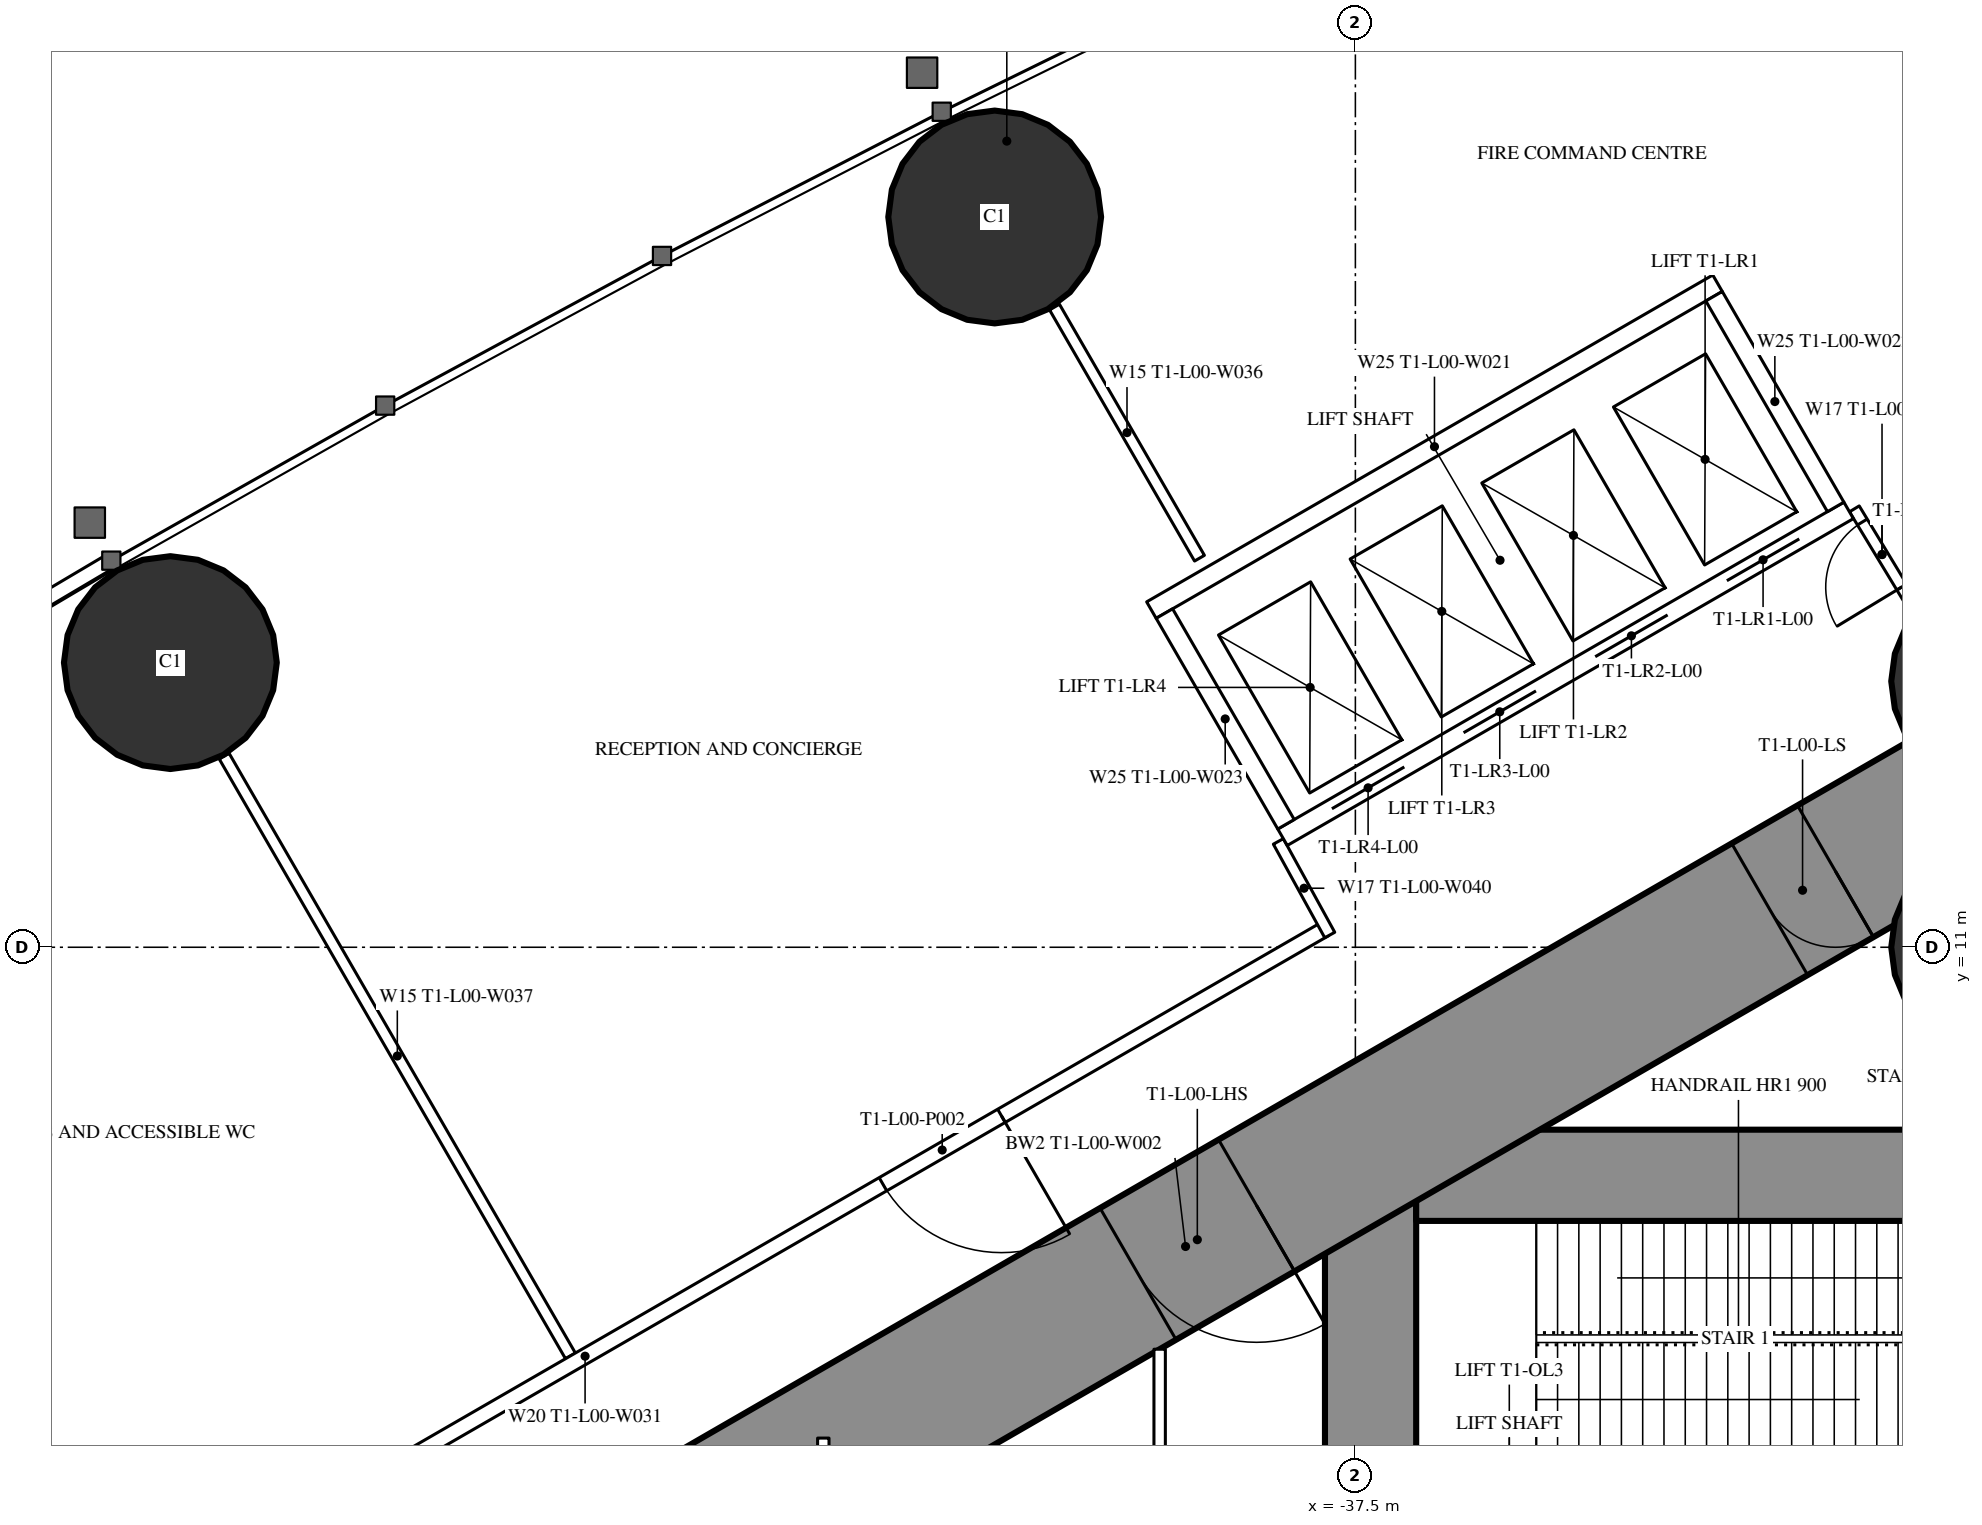
"""IFC4 building model, lengths in metres.
Left out: names, types, materials, properties, quantities, classifications, styles, units other than length and angle.
Written with IfcOpenShell. Run it as: python <this file> out.ifc"""

import sys

from ifc_helpers import new_model, si_unit, direction, frame, frame_2d, origin, origin_2d, place, context, subcontext, project, spatial, rectangle, hollow_circle, extrude, element, fill, save


model = new_model("IFC4")
c1 = context("Model", 3, precision=1e-05, world=origin(), true_north=direction((0.0, 1.0)))
c2 = subcontext(c1, "Body", "Model", "MODEL_VIEW")
j1 = project(units=[si_unit("LENGTHUNIT", "METRE"), si_unit("PLANEANGLEUNIT", "RADIAN")], contexts=[c1])
p1 = place(None, origin())
s1 = spatial("IfcSite", under=j1, at=p1, CompositionType="ELEMENT")
p2 = place(p1, origin())
s2 = spatial("IfcBuilding", under=s1, at=p2, CompositionType="ELEMENT")
p3 = place(p2, origin())
s3 = spatial("IfcBuildingStorey", under=s2, at=p3, CompositionType="ELEMENT", Elevation=0.0)
for number, where, z_axis, x_axis in (
    (1, (-29.05, 11.0, 0.0), (0.0, 0.0, 1.0), (1.0, 0.0, 0.0)),
    (2, (-29.05, 14.5, 0.0), (0.0, 0.0, 1.0), (1.0, 0.0, 0.0)),
    (3, (-42.245, 20.607, 0.0), (0.0, 0.0, 1.0), (1.0, 0.0, 0.0)),
    (4, (-53.09, 14.745, 0.0), (0.0, 0.0, 1.0), (1.0, 0.0, 0.0)),
):
    element("IfcColumn", number, at=place(p3, frame(where, z_axis=z_axis, x_axis=x_axis)), inside=s3, PredefinedType="COLUMN", context=c2, shape_type="SweptSolid", body=[
        extrude(hollow_circle(Radius=1.4, WallThickness=0.12, at=origin_2d()), origin(), (0.0, 0.0, 1.0), 7.2),
    ])
p4 = place(p3, frame((-37.3, 8.6, 0.0), z_axis=(0.0, 0.0, 1.0), x_axis=(0.0, -1.0, 0.0)))
e5 = element("IfcWall", 5, at=p4, inside=s3, PredefinedType="SHEAR", context=c2, shape_type="SweptSolid", body=[
    extrude(rectangle(XDim=17.2, YDim=1.2, at=frame_2d((8.6, 0.0))), origin(), (0.0, 0.0, 1.0), 7.2),
])
p5 = place(p4, frame((7.7, 0.0, 0.0)))
e6 = element("IfcOpeningElement", 6, at=p5, cuts=e5, PredefinedType="OPENING", context=c2, shape_type="SweptSolid", body=[
    extrude(rectangle(XDim=1.8, YDim=2.2, at=frame_2d((0.9, 1.1))), frame((0.0, 0.61, 0.0), z_axis=(0.0, -1.0, 0.0), x_axis=(1.0, 0.0, 0.0)), (0.0, 0.0, 1.0), 1.22),
])
p6 = place(p3, frame((-28.3, 8.0, 0.0), z_axis=(0.0, 0.0, 1.0), x_axis=(-1.0, 0.0, 0.0)))
e7 = element("IfcWall", 7, at=p6, inside=s3, PredefinedType="SHEAR", context=c2, shape_type="SweptSolid", body=[
    extrude(rectangle(XDim=8.4, YDim=1.2, at=frame_2d((4.2, 0.0))), origin(), (0.0, 0.0, 1.0), 7.2),
])
p7 = place(p6, frame((0.25, 0.0, 0.0)))
e8 = element("IfcOpeningElement", 8, at=p7, cuts=e7, PredefinedType="OPENING", context=c2, shape_type="SweptSolid", body=[
    extrude(rectangle(XDim=1.0, YDim=2.2, at=frame_2d((0.5, 1.1))), frame((0.0, 0.61, 0.0), z_axis=(0.0, -1.0, 0.0), x_axis=(1.0, 0.0, 0.0)), (0.0, 0.0, 1.0), 1.22),
])
p8 = place(p3, frame((-27.2, 14.3, 0.0), z_axis=(0.0, 0.0, 1.0), x_axis=(-0.866026593062, -0.499997940104, 0.0)))
e9 = element("IfcWall", 9, at=p8, inside=s3, PredefinedType="SHEAR", context=c2, shape_type="SweptSolid", body=[
    extrude(rectangle(XDim=28.946, YDim=2.0, at=frame_2d((14.473, 0.0))), origin(), (0.0, 0.0, 1.0), 7.2),
])
p9 = place(p8, frame((4.6, 0.0, 0.0)))
e10 = element("IfcOpeningElement", 10, at=p9, cuts=e9, PredefinedType="OPENING", context=c2, shape_type="SweptSolid", body=[
    extrude(rectangle(XDim=1.0, YDim=2.2, at=frame_2d((0.5, 1.1))), frame((0.0, 1.01, 0.0), z_axis=(0.0, -1.0, 0.0), x_axis=(1.0, 0.0, 0.0)), (0.0, 0.0, 1.0), 2.02),
])
p10 = place(p8, frame((13.395, 0.0, 0.0)))
e11 = element("IfcOpeningElement", 11, at=p10, cuts=e9, PredefinedType="OPENING", context=c2, shape_type="SweptSolid", body=[
    extrude(rectangle(XDim=1.8, YDim=2.2, at=frame_2d((0.9, 1.1))), frame((0.0, 1.01, 0.0), z_axis=(0.0, -1.0, 0.0), x_axis=(1.0, 0.0, 0.0)), (0.0, 0.0, 1.0), 2.02),
])
p11 = place(p3, frame((-57.429, 13.976, 0.0), z_axis=(0.0, 0.0, 1.0), x_axis=(0.860382514165, 0.50964882941, 0.0)))
e12 = element("IfcWall", 12, at=p11, inside=s3, PredefinedType="STANDARD", context=c2, shape_type="SweptSolid", body=[
    extrude(rectangle(XDim=4.14, YDim=0.2, at=frame_2d((2.07, 0.0))), origin(), (0.0, 0.0, 1.0), 6.85),
])
p12 = place(p11, frame((1.02, 0.0, 0.0)))
e13 = element("IfcOpeningElement", 13, at=p12, cuts=e12, PredefinedType="OPENING", context=c2, shape_type="SweptSolid", body=[
    extrude(rectangle(XDim=1.8, YDim=2.4, at=frame_2d((0.9, 1.2))), frame((0.0, 0.11, 0.0), z_axis=(0.0, -1.0, 0.0), x_axis=(1.0, 0.0, 0.0)), (0.0, 0.0, 1.0), 0.22),
])
p13 = place(p3, frame((-47.827, 5.624, 0.0), z_axis=(0.0, 0.0, 1.0), x_axis=(-0.499995404498, 0.866028056982, 0.0)))
e14 = element("IfcWall", 14, at=p13, inside=s3, PredefinedType="PARTITIONING", context=c2, shape_type="SweptSolid", body=[
    extrude(rectangle(XDim=9.11, YDim=0.15, at=frame_2d((4.555, 0.0))), origin(), (0.0, 0.0, 1.0), 5.85),
])
p14 = place(p3, frame((-39.551, 16.119, 0.0), z_axis=(0.0, 0.0, 1.0), x_axis=(-0.500014214979, 0.866017196607, 0.0)))
e15 = element("IfcWall", 15, at=p14, inside=s3, PredefinedType="PARTITIONING", context=c2, shape_type="SweptSolid", body=[
    extrude(rectangle(XDim=3.815, YDim=0.15, at=frame_2d((1.907, 0.0))), origin(), (0.0, 0.0, 1.0), 6.85),
])
p15 = place(p3, frame((-27.5, 17.244, 0.0), z_axis=(0.0, 0.0, 1.0), x_axis=(-0.866039316896, -0.499975901009, 0.0)))
e16 = element("IfcWall", 16, at=p15, inside=s3, PredefinedType="PARTITIONING", context=c2, shape_type="SweptSolid", body=[
    extrude(rectangle(XDim=3.169, YDim=0.2, at=frame_2d((1.584, 0.0))), origin(), (0.0, 0.0, 1.0), 6.85),
])
p16 = place(p3, frame((-37.9, 11.24, 0.0), z_axis=(0.0, 0.0, 1.0), x_axis=(-0.866022995118, -0.50000417191, 0.0)))
e17 = element("IfcWall", 17, at=p16, inside=s3, PredefinedType="PARTITIONING", context=c2, shape_type="SweptSolid", body=[
    extrude(rectangle(XDim=22.48, YDim=0.2, at=frame_2d((11.24, 0.0))), origin(), (0.0, 0.0, 1.0), 6.85),
])
p17 = place(p16, frame((14.644, 0.0, 0.0)))
e18 = element("IfcOpeningElement", 18, at=p17, cuts=e17, PredefinedType="OPENING", context=c2, shape_type="SweptSolid", body=[
    extrude(rectangle(XDim=1.8, YDim=2.2, at=frame_2d((0.9, 1.1))), frame((0.0, 0.11, 0.0), z_axis=(0.0, -1.0, 0.0), x_axis=(1.0, 0.0, 0.0)), (0.0, 0.0, 1.0), 0.22),
])
p18 = place(p16, frame((20.069, 0.0, 0.0)))
e19 = element("IfcOpeningElement", 19, at=p18, cuts=e17, PredefinedType="OPENING", context=c2, shape_type="SweptSolid", body=[
    extrude(rectangle(XDim=1.8, YDim=2.2, at=frame_2d((0.9, 1.1))), frame((0.0, 0.11, 0.0), z_axis=(0.0, -1.0, 0.0), x_axis=(1.0, 0.0, 0.0)), (0.0, 0.0, 1.0), 0.22),
])
p19 = place(p16, frame((4.915, 0.0, 0.0)))
e20 = element("IfcOpeningElement", 20, at=p19, cuts=e17, PredefinedType="OPENING", context=c2, shape_type="SweptSolid", body=[
    extrude(rectangle(XDim=1.8, YDim=2.2, at=frame_2d((0.9, 1.1))), frame((0.0, 0.11, 0.0), z_axis=(0.0, -1.0, 0.0), x_axis=(1.0, 0.0, 0.0)), (0.0, 0.0, 1.0), 0.22),
])
p20 = place(p3, frame((-30.207, 15.566, 0.0), z_axis=(0.0, 0.0, 1.0), x_axis=(-0.518374889333, 0.855153479855, 0.0)))
e21 = element("IfcWall", 21, at=p20, inside=s3, PredefinedType="PARTITIONING", context=c2, shape_type="SweptSolid", body=[
    extrude(rectangle(XDim=1.405, YDim=0.15, at=frame_2d((0.703, 0.0))), origin(), (0.0, 0.0, 1.0), 6.85),
])
p21 = place(p20, frame((0.202, 0.0, 0.0)))
e22 = element("IfcOpeningElement", 22, at=p21, cuts=e21, PredefinedType="OPENING", context=c2, shape_type="SweptSolid", body=[
    extrude(rectangle(XDim=1.0, YDim=2.2, at=frame_2d((0.5, 1.1))), frame((0.0, 0.085, 0.0), z_axis=(0.0, -1.0, 0.0), x_axis=(1.0, 0.0, 0.0)), (0.0, 0.0, 1.0), 0.17),
])
p22 = place(p3, frame((-38.513, 12.392, 0.0), z_axis=(0.0, 0.0, 1.0), x_axis=(0.481358300093, -0.876523922624, 0.0)))
e23 = element("IfcWall", 23, at=p22, inside=s3, PredefinedType="PARTITIONING", context=c2, shape_type="SweptSolid", body=[
    extrude(rectangle(XDim=1.405, YDim=0.15, at=frame_2d((0.703, 0.0))), origin(), (0.0, 0.0, 1.0), 6.85),
])
p23 = place(p3, frame((-40.075, 5.712, 0.0), z_axis=(0.0, 0.0, 1.0), x_axis=(0.0, -1.0, 0.0)))
e24 = element("IfcWall", 24, at=p23, inside=s3, PredefinedType="PARTITIONING", context=c2, shape_type="SweptSolid", body=[
    extrude(rectangle(XDim=11.424, YDim=0.15, at=frame_2d((5.712, 0.0))), origin(), (0.0, 0.0, 1.0), 6.85),
])
p24 = place(p23, frame((4.812, 0.0, 0.0)))
e25 = element("IfcOpeningElement", 25, at=p24, cuts=e24, PredefinedType="OPENING", context=c2, shape_type="SweptSolid", body=[
    extrude(rectangle(XDim=1.8, YDim=2.2, at=frame_2d((0.9, 1.1))), frame((0.0, 0.085, 0.0), z_axis=(0.0, -1.0, 0.0), x_axis=(1.0, 0.0, 0.0)), (0.0, 0.0, 1.0), 0.17),
])
p25 = place(p3, frame((-44.5, 4.543, 0.0), z_axis=(0.0, 0.0, 1.0), x_axis=(0.0, -1.0, 0.0)))
e26 = element("IfcWall", 26, at=p25, inside=s3, PredefinedType="PARTITIONING", context=c2, shape_type="SweptSolid", body=[
    extrude(rectangle(XDim=9.085, YDim=0.15, at=frame_2d((4.543, 0.0))), origin(), (0.0, 0.0, 1.0), 6.85),
])
p26 = place(p25, frame((4.043, 0.0, 0.0)))
e27 = element("IfcOpeningElement", 27, at=p26, cuts=e26, PredefinedType="OPENING", context=c2, shape_type="SweptSolid", body=[
    extrude(rectangle(XDim=1.0, YDim=2.2, at=frame_2d((0.5, 1.1))), frame((0.0, 0.085, 0.0), z_axis=(0.0, -1.0, 0.0), x_axis=(1.0, 0.0, 0.0)), (0.0, 0.0, 1.0), 0.17),
])
p27 = place(p3, frame((-31.01, 16.747, 0.0), z_axis=(0.0, 0.0, 1.0), x_axis=(-0.866028165386, -0.499995216735, 0.0)))
e28 = element("IfcWall", 28, at=p27, inside=s3, PredefinedType="PARTITIONING", context=c2, shape_type="SweptSolid", body=[
    extrude(rectangle(XDim=8.6, YDim=0.25, at=frame_2d((4.3, 0.0))), origin(), (0.0, 0.0, 1.0), 6.85),
])
p28 = place(p27, frame((0.75, 0.0, 0.0)))
e29 = element("IfcOpeningElement", 29, at=p28, cuts=e28, PredefinedType="OPENING", context=c2, shape_type="SweptSolid", body=[
    extrude(rectangle(XDim=1.1, YDim=2.2, at=frame_2d((0.55, 1.1))), frame((0.0, 0.135, 0.0), z_axis=(0.0, -1.0, 0.0), x_axis=(1.0, 0.0, 0.0)), (0.0, 0.0, 1.0), 0.27),
])
p29 = place(p27, frame((2.75, 0.0, 0.0)))
e30 = element("IfcOpeningElement", 30, at=p29, cuts=e28, PredefinedType="OPENING", context=c2, shape_type="SweptSolid", body=[
    extrude(rectangle(XDim=1.1, YDim=2.2, at=frame_2d((0.55, 1.1))), frame((0.0, 0.135, 0.0), z_axis=(0.0, -1.0, 0.0), x_axis=(1.0, 0.0, 0.0)), (0.0, 0.0, 1.0), 0.27),
])
p30 = place(p27, frame((4.75, 0.0, 0.0)))
e31 = element("IfcOpeningElement", 31, at=p30, cuts=e28, PredefinedType="OPENING", context=c2, shape_type="SweptSolid", body=[
    extrude(rectangle(XDim=1.1, YDim=2.2, at=frame_2d((0.55, 1.1))), frame((0.0, 0.135, 0.0), z_axis=(0.0, -1.0, 0.0), x_axis=(1.0, 0.0, 0.0)), (0.0, 0.0, 1.0), 0.27),
])
p31 = place(p27, frame((6.75, 0.0, 0.0)))
e32 = element("IfcOpeningElement", 32, at=p31, cuts=e28, PredefinedType="OPENING", context=c2, shape_type="SweptSolid", body=[
    extrude(rectangle(XDim=1.1, YDim=2.2, at=frame_2d((0.55, 1.1))), frame((0.0, 0.135, 0.0), z_axis=(0.0, -1.0, 0.0), x_axis=(1.0, 0.0, 0.0)), (0.0, 0.0, 1.0), 0.27),
])
p32 = place(p3, frame((-32.736, 19.736, 0.0), z_axis=(0.0, 0.0, 1.0), x_axis=(-0.866028165386, -0.499995216735, 0.0)))
e33 = element("IfcWall", 33, at=p32, inside=s3, PredefinedType="PARTITIONING", context=c2, shape_type="SweptSolid", body=[
    extrude(rectangle(XDim=8.6, YDim=0.25, at=frame_2d((4.3, 0.0))), origin(), (0.0, 0.0, 1.0), 6.85),
])
p33 = place(p3, frame((-31.181, 16.793, 0.0), z_axis=(0.0, 0.0, 1.0), x_axis=(-0.499929347863, 0.866066190972, 0.0)))
e34 = element("IfcWall", 34, at=p33, inside=s3, PredefinedType="PARTITIONING", context=c2, shape_type="SweptSolid", body=[
    extrude(rectangle(XDim=3.201, YDim=0.25, at=frame_2d((1.6, 0.0))), origin(), (0.0, 0.0, 1.0), 6.85),
])
p34 = place(p3, frame((-38.413, 12.618, 0.0), z_axis=(0.0, 0.0, 1.0), x_axis=(-0.499872130319, 0.866099216793, 0.0)))
e35 = element("IfcWall", 35, at=p34, inside=s3, PredefinedType="PARTITIONING", context=c2, shape_type="SweptSolid", body=[
    extrude(rectangle(XDim=3.2, YDim=0.25, at=frame_2d((1.6, 0.0))), origin(), (0.0, 0.0, 1.0), 6.85),
])
p35 = place(p21, origin())
e36 = element("IfcDoor", 36, at=p35, inside=s3, OperationType="SINGLE_SWING_LEFT", PredefinedType="DOOR", context=c2, shape_type="SweptSolid", body=[
    extrude(rectangle(XDim=1.0, YDim=2.2, at=frame_2d((0.5, 1.1))), frame((0.0, 0.025, 0.0), z_axis=(0.0, -1.0, 0.0), x_axis=(1.0, 0.0, 0.0)), (0.0, 0.0, 1.0), 0.05),
])
fill(e22, e36)
p36 = place(p19, origin())
e37 = element("IfcDoor", 37, at=p36, inside=s3, OperationType="DOUBLE_DOOR_SINGLE_SWING", PredefinedType="DOOR", context=c2, shape_type="SweptSolid", body=[
    extrude(rectangle(XDim=1.8, YDim=2.2, at=frame_2d((0.9, 1.1))), frame((0.0, 0.025, 0.0), z_axis=(0.0, -1.0, 0.0), x_axis=(1.0, 0.0, 0.0)), (0.0, 0.0, 1.0), 0.05),
])
fill(e20, e37)
p37 = place(p9, origin())
e38 = element("IfcDoor", 38, at=p37, inside=s3, OperationType="SINGLE_SWING_LEFT", PredefinedType="DOOR", context=c2, shape_type="SweptSolid", body=[
    extrude(rectangle(XDim=1.0, YDim=2.2, at=frame_2d((0.5, 1.1))), frame((0.0, 0.025, 0.0), z_axis=(0.0, -1.0, 0.0), x_axis=(1.0, 0.0, 0.0)), (0.0, 0.0, 1.0), 0.05),
])
fill(e10, e38)
p38 = place(p10, origin())
e39 = element("IfcDoor", 39, at=p38, inside=s3, OperationType="DOUBLE_DOOR_SINGLE_SWING", PredefinedType="DOOR", context=c2, shape_type="SweptSolid", body=[
    extrude(rectangle(XDim=1.8, YDim=2.2, at=frame_2d((0.9, 1.1))), frame((0.0, 0.025, 0.0), z_axis=(0.0, -1.0, 0.0), x_axis=(1.0, 0.0, 0.0)), (0.0, 0.0, 1.0), 0.05),
])
fill(e11, e39)
p39 = place(p28, origin())
e40 = element("IfcDoor", 40, at=p39, inside=s3, OperationType="DOUBLE_DOOR_SLIDING", PredefinedType="USERDEFINED", context=c2, shape_type="SweptSolid", body=[
    extrude(rectangle(XDim=1.1, YDim=2.2, at=frame_2d((0.55, 1.1))), frame((0.0, 0.025, 0.0), z_axis=(0.0, -1.0, 0.0), x_axis=(1.0, 0.0, 0.0)), (0.0, 0.0, 1.0), 0.05),
])
fill(e29, e40)
p40 = place(p29, origin())
e41 = element("IfcDoor", 41, at=p40, inside=s3, OperationType="DOUBLE_DOOR_SLIDING", PredefinedType="USERDEFINED", context=c2, shape_type="SweptSolid", body=[
    extrude(rectangle(XDim=1.1, YDim=2.2, at=frame_2d((0.55, 1.1))), frame((0.0, 0.025, 0.0), z_axis=(0.0, -1.0, 0.0), x_axis=(1.0, 0.0, 0.0)), (0.0, 0.0, 1.0), 0.05),
])
fill(e30, e41)
p41 = place(p30, origin())
e42 = element("IfcDoor", 42, at=p41, inside=s3, OperationType="DOUBLE_DOOR_SLIDING", PredefinedType="USERDEFINED", context=c2, shape_type="SweptSolid", body=[
    extrude(rectangle(XDim=1.1, YDim=2.2, at=frame_2d((0.55, 1.1))), frame((0.0, 0.025, 0.0), z_axis=(0.0, -1.0, 0.0), x_axis=(1.0, 0.0, 0.0)), (0.0, 0.0, 1.0), 0.05),
])
fill(e31, e42)
p42 = place(p31, origin())
e43 = element("IfcDoor", 43, at=p42, inside=s3, OperationType="DOUBLE_DOOR_SLIDING", PredefinedType="USERDEFINED", context=c2, shape_type="SweptSolid", body=[
    extrude(rectangle(XDim=1.1, YDim=2.2, at=frame_2d((0.55, 1.1))), frame((0.0, 0.025, 0.0), z_axis=(0.0, -1.0, 0.0), x_axis=(1.0, 0.0, 0.0)), (0.0, 0.0, 1.0), 0.05),
])
fill(e32, e43)
save(model, sys.argv[1])
